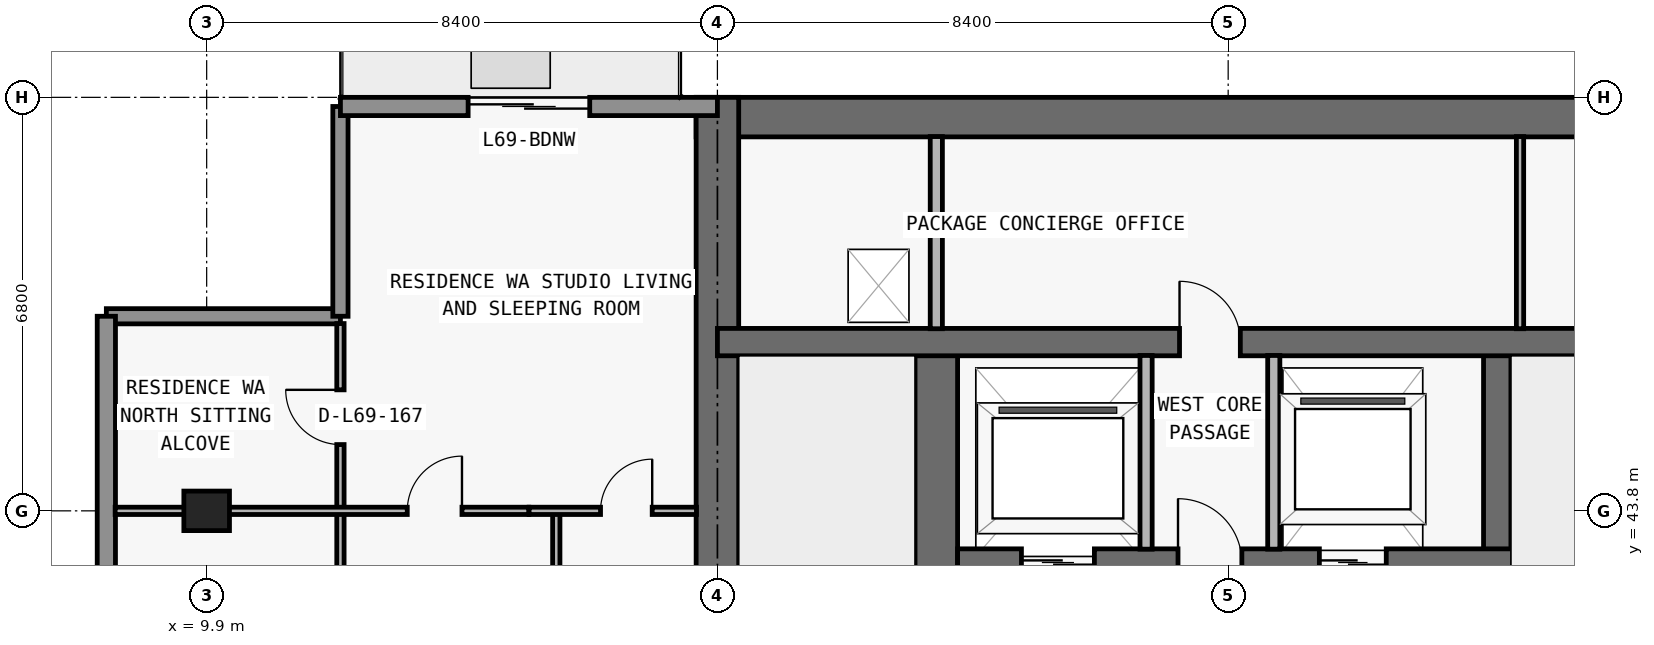
"""IFC4 building model, lengths in metres.
Left out: names, types, materials, properties, quantities, classifications, styles, units other than length and angle.
Written with IfcOpenShell. Run it as: python <this file> out.ifc"""

import sys

from ifc_helpers import new_model, si_unit, direction, frame, frame_2d, origin, origin_2d, place, context, subcontext, project, spatial, rectangle, extrude, element, fill, save


model = new_model("IFC4")
c1 = context("Model", 3, precision=1e-05, world=origin(), true_north=direction((0.0, 1.0)))
c2 = subcontext(c1, "Body", "Model", "MODEL_VIEW")
j1 = project(units=[si_unit("LENGTHUNIT", "METRE"), si_unit("PLANEANGLEUNIT", "RADIAN")], contexts=[c1])
p1 = place(None, origin())
s1 = spatial("IfcSite", under=j1, at=p1, CompositionType="ELEMENT")
p2 = place(p1, origin())
s2 = spatial("IfcBuilding", under=s1, at=p2, CompositionType="ELEMENT")
p3 = place(p2, frame((0.0, 0.0, 246.3)))
s3 = spatial("IfcBuildingStorey", under=s2, at=p3, CompositionType="ELEMENT", Elevation=246.3)
p4 = place(p3, frame((9.9, 43.8, 0.0), z_axis=(0.0, 0.0, 1.0), x_axis=(1.0, 0.0, 0.0)))
e1 = element("IfcColumn", 1, at=p4, inside=s3, PredefinedType="COLUMN", context=c2, shape_type="SweptSolid", body=[
    extrude(rectangle(XDim=0.75, YDim=0.65, at=origin_2d()), origin(), (0.0, 0.0, 1.0), 3.05),
])
p5 = place(p3, frame((17.95, 50.275, 0.0), z_axis=(0.0, 0.0, 1.0), x_axis=(1.0, 0.0, 0.0)))
e2 = element("IfcWall", 2, at=p5, inside=s3, PredefinedType="SHEAR", context=c2, shape_type="SweptSolid", body=[
    extrude(rectangle(XDim=41.9, YDim=0.65, at=frame_2d((20.95, 0.0))), origin(), (0.0, 0.0, 1.0), 3.05),
])
p6 = place(p3, frame((18.3, 36.65, 0.0), z_axis=(0.0, 0.0, 1.0), x_axis=(0.0, 1.0, 0.0)))
e3 = element("IfcWall", 3, at=p6, inside=s3, PredefinedType="SHEAR", context=c2, shape_type="SweptSolid", body=[
    extrude(rectangle(XDim=13.95, YDim=0.7, at=frame_2d((6.975, 0.0))), origin(), (0.0, 0.0, 1.0), 3.05),
])
p7 = place(p3, frame((21.9, 37.0, 0.0), z_axis=(0.0, 0.0, 1.0), x_axis=(0.0, 1.0, 0.0)))
e4 = element("IfcWall", 4, at=p7, inside=s3, PredefinedType="SHEAR", context=c2, shape_type="SweptSolid", body=[
    extrude(rectangle(XDim=9.575, YDim=0.7, at=frame_2d((4.788, 0.0))), origin(), (0.0, 0.0, 1.0), 3.05),
])
p8 = place(p7, frame((0.55, 0.0, 0.0)))
e5 = element("IfcOpeningElement", 5, at=p8, cuts=e4, PredefinedType="OPENING", context=c2, shape_type="SweptSolid", body=[
    extrude(rectangle(XDim=1.1, YDim=2.15, at=frame_2d((0.55, 1.075))), frame((0.0, 0.36, 0.0), z_axis=(0.0, -1.0, 0.0), x_axis=(1.0, 0.0, 0.0)), (0.0, 0.0, 1.0), 0.72),
])
p9 = place(p3, frame((31.125, 37.0, 0.0), z_axis=(0.0, 0.0, 1.0), x_axis=(0.0, 1.0, 0.0)))
e6 = element("IfcWall", 6, at=p9, inside=s3, PredefinedType="SHEAR", context=c2, shape_type="SweptSolid", body=[
    extrude(rectangle(XDim=9.575, YDim=0.45, at=frame_2d((4.788, 0.0))), origin(), (0.0, 0.0, 1.0), 3.05),
])
p10 = place(p3, frame((22.25, 42.95, 0.0), z_axis=(0.0, 0.0, 1.0), x_axis=(1.0, 0.0, 0.0)))
e7 = element("IfcWall", 7, at=p10, inside=s3, PredefinedType="SHEAR", context=c2, shape_type="SweptSolid", body=[
    extrude(rectangle(XDim=33.3, YDim=0.45, at=frame_2d((16.65, 0.0))), origin(), (0.0, 0.0, 1.0), 3.05),
])
p11 = place(p10, frame((1.05, 0.0, 0.0)))
e8 = element("IfcOpeningElement", 8, at=p11, cuts=e7, PredefinedType="OPENING", context=c2, shape_type="SweptSolid", body=[
    extrude(rectangle(XDim=1.2, YDim=2.2, at=frame_2d((0.6, 1.1))), frame((0.0, 0.235, 0.0), z_axis=(0.0, -1.0, 0.0), x_axis=(1.0, 0.0, 0.0)), (0.0, 0.0, 1.0), 0.47),
])
p12 = place(p10, frame((31.05, 0.0, 0.0)))
e9 = element("IfcOpeningElement", 9, at=p12, cuts=e7, PredefinedType="OPENING", context=c2, shape_type="SweptSolid", body=[
    extrude(rectangle(XDim=1.2, YDim=2.2, at=frame_2d((0.6, 1.1))), frame((0.0, 0.235, 0.0), z_axis=(0.0, -1.0, 0.0), x_axis=(1.0, 0.0, 0.0)), (0.0, 0.0, 1.0), 0.47),
])
p13 = place(p10, frame((26.45, 0.0, 0.0)))
e10 = element("IfcOpeningElement", 10, at=p13, cuts=e7, PredefinedType="OPENING", context=c2, shape_type="SweptSolid", body=[
    extrude(rectangle(XDim=1.1, YDim=2.2, at=frame_2d((0.55, 1.1))), frame((0.0, 0.235, 0.0), z_axis=(0.0, -1.0, 0.0), x_axis=(1.0, 0.0, 0.0)), (0.0, 0.0, 1.0), 0.47),
])
p14 = place(p10, frame((5.95, 0.0, 0.0)))
e11 = element("IfcOpeningElement", 11, at=p14, cuts=e7, PredefinedType="OPENING", context=c2, shape_type="SweptSolid", body=[
    extrude(rectangle(XDim=1.1, YDim=2.2, at=frame_2d((0.55, 1.1))), frame((0.0, 0.235, 0.0), z_axis=(0.0, -1.0, 0.0), x_axis=(1.0, 0.0, 0.0)), (0.0, 0.0, 1.0), 0.47),
])
p15 = place(p10, frame((3.625, 0.0, 0.0)))
e12 = element("IfcOpeningElement", 12, at=p15, cuts=e7, PredefinedType="OPENING", context=c2, shape_type="SweptSolid", body=[
    extrude(rectangle(XDim=1.05, YDim=2.15, at=frame_2d((0.525, 1.075))), frame((0.0, 0.235, 0.0), z_axis=(0.0, -1.0, 0.0), x_axis=(1.0, 0.0, 0.0)), (0.0, 0.0, 1.0), 0.47),
])
p16 = place(p10, frame((28.675, 0.0, 0.0)))
e13 = element("IfcOpeningElement", 13, at=p16, cuts=e7, PredefinedType="OPENING", context=c2, shape_type="SweptSolid", body=[
    extrude(rectangle(XDim=1.05, YDim=2.15, at=frame_2d((0.525, 1.075))), frame((0.0, 0.235, 0.0), z_axis=(0.0, -1.0, 0.0), x_axis=(1.0, 0.0, 0.0)), (0.0, 0.0, 1.0), 0.47),
])
p17 = place(p10, frame((14.7, 0.0, 0.0)))
e14 = element("IfcOpeningElement", 14, at=p17, cuts=e7, PredefinedType="OPENING", context=c2, shape_type="SweptSolid", body=[
    extrude(rectangle(XDim=1.0, YDim=2.2, at=frame_2d((0.5, 1.1))), frame((0.0, 0.235, 0.0), z_axis=(0.0, -1.0, 0.0), x_axis=(1.0, 0.0, 0.0)), (0.0, 0.0, 1.0), 0.47),
])
p18 = place(p10, frame((21.45, 0.0, 0.0)))
e15 = element("IfcOpeningElement", 15, at=p18, cuts=e7, PredefinedType="OPENING", context=c2, shape_type="SweptSolid", body=[
    extrude(rectangle(XDim=1.0, YDim=2.2, at=frame_2d((0.5, 1.1))), frame((0.0, 0.235, 0.0), z_axis=(0.0, -1.0, 0.0), x_axis=(1.0, 0.0, 0.0)), (0.0, 0.0, 1.0), 0.47),
])
p19 = place(p3, frame((18.3, 46.575, 0.0), z_axis=(0.0, 0.0, 1.0), x_axis=(1.0, 0.0, 0.0)))
e16 = element("IfcWall", 16, at=p19, inside=s3, PredefinedType="SHEAR", context=c2, shape_type="SweptSolid", body=[
    extrude(rectangle(XDim=41.2, YDim=0.45, at=frame_2d((20.6, 0.0))), origin(), (0.0, 0.0, 1.0), 3.05),
])
p20 = place(p19, frame((7.6, 0.0, 0.0)))
e17 = element("IfcOpeningElement", 17, at=p20, cuts=e16, PredefinedType="OPENING", context=c2, shape_type="SweptSolid", body=[
    extrude(rectangle(XDim=1.0, YDim=2.2, at=frame_2d((0.5, 1.1))), frame((0.0, 0.235, 0.0), z_axis=(0.0, -1.0, 0.0), x_axis=(1.0, 0.0, 0.0)), (0.0, 0.0, 1.0), 0.47),
])
p21 = place(p19, frame((32.625, 0.0, 0.0)))
e18 = element("IfcOpeningElement", 18, at=p21, cuts=e16, PredefinedType="OPENING", context=c2, shape_type="SweptSolid", body=[
    extrude(rectangle(XDim=1.05, YDim=2.15, at=frame_2d((0.525, 1.075))), frame((0.0, 0.235, 0.0), z_axis=(0.0, -1.0, 0.0), x_axis=(1.0, 0.0, 0.0)), (0.0, 0.0, 1.0), 0.47),
])
p22 = place(p3, frame((8.25, 47.0, 0.0), z_axis=(0.0, 0.0, 1.0), x_axis=(1.0, 0.0, 0.0)))
e19 = element("IfcWall", 19, at=p22, inside=s3, PredefinedType="ELEMENTEDWALL", context=c2, shape_type="SweptSolid", body=[
    extrude(rectangle(XDim=3.85, YDim=0.25, at=frame_2d((1.925, 0.0))), origin(), (0.0, 0.0, 1.0), 3.05),
])
p23 = place(p3, frame((12.1, 47.0, 0.0), z_axis=(0.0, 0.0, 1.0), x_axis=(0.0, 1.0, 0.0)))
e20 = element("IfcWall", 20, at=p23, inside=s3, PredefinedType="ELEMENTEDWALL", context=c2, shape_type="SweptSolid", body=[
    extrude(rectangle(XDim=3.45, YDim=0.25, at=frame_2d((1.725, 0.0))), origin(), (0.0, 0.0, 1.0), 3.05),
])
p24 = place(p3, frame((8.25, 30.15, 0.0), z_axis=(0.0, 0.0, 1.0), x_axis=(0.0, 1.0, 0.0)))
e21 = element("IfcWall", 21, at=p24, inside=s3, PredefinedType="STANDARD", context=c2, shape_type="SweptSolid", body=[
    extrude(rectangle(XDim=16.85, YDim=0.3, at=frame_2d((8.425, 0.0))), origin(), (0.0, 0.0, 1.0), 3.05),
])
p25 = place(p3, frame((12.1, 50.45, 0.0), z_axis=(0.0, 0.0, 1.0), x_axis=(1.0, 0.0, 0.0)))
e22 = element("IfcWall", 22, at=p25, inside=s3, PredefinedType="STANDARD", context=c2, shape_type="SweptSolid", body=[
    extrude(rectangle(XDim=6.2, YDim=0.3, at=frame_2d((3.1, 0.0))), origin(), (0.0, 0.0, 1.0), 3.05),
])
p26 = place(p25, frame((2.1, 0.0, 0.0)))
e23 = element("IfcOpeningElement", 23, at=p26, cuts=e22, PredefinedType="OPENING", context=c2, shape_type="SweptSolid", body=[
    extrude(rectangle(XDim=2.0, YDim=2.3, at=frame_2d((1.0, 1.15))), frame((0.0, 0.16, 0.0), z_axis=(0.0, -1.0, 0.0), x_axis=(1.0, 0.0, 0.0)), (0.0, 0.0, 1.0), 0.32),
])
p27 = place(p3, frame((12.1, 37.005, 0.0), z_axis=(0.0, 0.0, 1.0), x_axis=(0.0, 1.0, 0.0)))
e24 = element("IfcWall", 24, at=p27, inside=s3, PredefinedType="PARTITIONING", context=c2, shape_type="SweptSolid", body=[
    extrude(rectangle(XDim=9.875, YDim=0.12, at=frame_2d((4.938, 0.0))), origin(), (0.0, 0.0, 1.0), 2.725),
])
p28 = place(p27, frame((2.948, 0.0, 0.0)))
e25 = element("IfcOpeningElement", 25, at=p28, cuts=e24, PredefinedType="OPENING", context=c2, shape_type="SweptSolid", body=[
    extrude(rectangle(XDim=0.9, YDim=2.15, at=frame_2d((0.45, 1.075))), frame((0.0, 0.07, 0.0), z_axis=(0.0, -1.0, 0.0), x_axis=(1.0, 0.0, 0.0)), (0.0, 0.0, 1.0), 0.14),
])
p29 = place(p27, frame((7.885, 0.0, 0.0)))
e26 = element("IfcOpeningElement", 26, at=p29, cuts=e24, PredefinedType="OPENING", context=c2, shape_type="SweptSolid", body=[
    extrude(rectangle(XDim=0.9, YDim=2.15, at=frame_2d((0.45, 1.075))), frame((0.0, 0.07, 0.0), z_axis=(0.0, -1.0, 0.0), x_axis=(1.0, 0.0, 0.0)), (0.0, 0.0, 1.0), 0.14),
])
p30 = place(p3, frame((15.65, 37.0, 0.0), z_axis=(0.0, 0.0, 1.0), x_axis=(0.0, 1.0, 0.0)))
e27 = element("IfcWall", 27, at=p30, inside=s3, PredefinedType="PARTITIONING", context=c2, shape_type="SweptSolid", body=[
    extrude(rectangle(XDim=6.8, YDim=0.12, at=frame_2d((3.4, 0.0))), origin(), (0.0, 0.0, 1.0), 3.05),
])
p31 = place(p30, frame((1.207, 0.0, 0.0)))
e28 = element("IfcOpeningElement", 28, at=p31, cuts=e27, PredefinedType="OPENING", context=c2, shape_type="SweptSolid", body=[
    extrude(rectangle(XDim=0.85, YDim=2.1, at=frame_2d((0.425, 1.05))), frame((0.0, 0.07, 0.0), z_axis=(0.0, -1.0, 0.0), x_axis=(1.0, 0.0, 0.0)), (0.0, 0.0, 1.0), 0.14),
])
p32 = place(p3, frame((21.9, 46.795, 0.0), z_axis=(0.0, 0.0, 1.0), x_axis=(0.0, 1.0, 0.0)))
e29 = element("IfcWall", 29, at=p32, inside=s3, PredefinedType="PARTITIONING", context=c2, shape_type="SweptSolid", body=[
    extrude(rectangle(XDim=3.16, YDim=0.2, at=frame_2d((1.58, 0.0))), origin(), (0.0, 0.0, 1.0), 3.05),
])
for number, where, z_axis, x_axis in (
    (30, (25.35, 43.17, 0.0), (0.0, 0.0, 1.0), (0.0, 1.0, 0.0)),
    (31, (27.45, 43.17, 0.0), (0.0, 0.0, 1.0), (0.0, 1.0, 0.0)),
):
    element("IfcWall", number, at=place(p3, frame(where, z_axis=z_axis, x_axis=x_axis)), inside=s3, PredefinedType="PARTITIONING", context=c2, shape_type="SweptSolid", body=[
        extrude(rectangle(XDim=3.185, YDim=0.2, at=frame_2d((1.593, 0.0))), origin(), (0.0, 0.0, 1.0), 3.05),
    ])
p33 = place(p3, frame((31.5, 46.795, 0.0), z_axis=(0.0, 0.0, 1.0), x_axis=(0.0, 1.0, 0.0)))
e32 = element("IfcWall", 32, at=p33, inside=s3, PredefinedType="PARTITIONING", context=c2, shape_type="SweptSolid", body=[
    extrude(rectangle(XDim=3.16, YDim=0.12, at=frame_2d((1.58, 0.0))), origin(), (0.0, 0.0, 1.0), 3.05),
])
p34 = place(p3, frame((8.395, 43.8, 0.0), z_axis=(0.0, 0.0, 1.0), x_axis=(1.0, 0.0, 0.0)))
e33 = element("IfcWall", 33, at=p34, inside=s3, PredefinedType="PARTITIONING", context=c2, shape_type="SweptSolid", body=[
    extrude(rectangle(XDim=6.803, YDim=0.12, at=frame_2d((3.401, 0.0))), origin(), (0.0, 0.0, 1.0), 2.418),
])
p35 = place(p34, frame((4.804, 0.0, 0.0)))
e34 = element("IfcOpeningElement", 34, at=p35, cuts=e33, PredefinedType="OPENING", context=c2, shape_type="SweptSolid", body=[
    extrude(rectangle(XDim=0.9, YDim=2.15, at=frame_2d((0.45, 1.075))), frame((0.0, 0.07, 0.0), z_axis=(0.0, -1.0, 0.0), x_axis=(1.0, 0.0, 0.0)), (0.0, 0.0, 1.0), 0.14),
])
p36 = place(p3, frame((15.203, 43.8, 0.0), z_axis=(0.0, 0.0, 1.0), x_axis=(1.0, 0.0, 0.0)))
e35 = element("IfcWall", 35, at=p36, inside=s3, PredefinedType="PARTITIONING", context=c2, shape_type="SweptSolid", body=[
    extrude(rectangle(XDim=2.752, YDim=0.12, at=frame_2d((1.376, 0.0))), origin(), (0.0, 0.0, 1.0), 2.418),
])
p37 = place(p36, frame((1.175, 0.0, 0.0)))
e36 = element("IfcOpeningElement", 36, at=p37, cuts=e35, PredefinedType="OPENING", context=c2, shape_type="SweptSolid", body=[
    extrude(rectangle(XDim=0.85, YDim=2.1, at=frame_2d((0.425, 1.05))), frame((0.0, 0.07, 0.0), z_axis=(0.0, -1.0, 0.0), x_axis=(1.0, 0.0, 0.0)), (0.0, 0.0, 1.0), 0.14),
])
p38 = place(p26, origin())
e37 = element("IfcDoor", 37, at=p38, inside=s3, OperationType="DOUBLE_DOOR_SLIDING", PredefinedType="DOOR", context=c2, shape_type="SweptSolid", body=[
    extrude(rectangle(XDim=2.0, YDim=2.3, at=frame_2d((1.0, 1.15))), frame((0.0, 0.025, 0.0), z_axis=(0.0, -1.0, 0.0), x_axis=(1.0, 0.0, 0.0)), (0.0, 0.0, 1.0), 0.05),
])
fill(e23, e37)
p39 = place(p11, origin())
e38 = element("IfcDoor", 38, at=p39, inside=s3, OperationType="DOUBLE_DOOR_SLIDING", PredefinedType="DOOR", context=c2, shape_type="SweptSolid", body=[
    extrude(rectangle(XDim=1.2, YDim=2.2, at=frame_2d((0.6, 1.1))), frame((0.0, 0.025, 0.0), z_axis=(0.0, -1.0, 0.0), x_axis=(1.0, 0.0, 0.0)), (0.0, 0.0, 1.0), 0.05),
])
fill(e8, e38)
p40 = place(p14, origin())
e39 = element("IfcDoor", 39, at=p40, inside=s3, OperationType="DOUBLE_DOOR_SLIDING", PredefinedType="DOOR", context=c2, shape_type="SweptSolid", body=[
    extrude(rectangle(XDim=1.1, YDim=2.2, at=frame_2d((0.55, 1.1))), frame((0.0, 0.025, 0.0), z_axis=(0.0, -1.0, 0.0), x_axis=(1.0, 0.0, 0.0)), (0.0, 0.0, 1.0), 0.05),
])
fill(e11, e39)
p41 = place(p15, origin())
e40 = element("IfcDoor", 40, at=p41, inside=s3, OperationType="SINGLE_SWING_LEFT", PredefinedType="DOOR", context=c2, shape_type="SweptSolid", body=[
    extrude(rectangle(XDim=1.05, YDim=2.15, at=frame_2d((0.525, 1.075))), frame((0.0, 0.025, 0.0), z_axis=(0.0, -1.0, 0.0), x_axis=(1.0, 0.0, 0.0)), (0.0, 0.0, 1.0), 0.05),
])
fill(e12, e40)
p42 = place(p20, origin())
e41 = element("IfcDoor", 41, at=p42, inside=s3, OperationType="SINGLE_SWING_LEFT", PredefinedType="DOOR", context=c2, shape_type="SweptSolid", body=[
    extrude(rectangle(XDim=1.0, YDim=2.2, at=frame_2d((0.5, 1.1))), frame((0.0, 0.025, 0.0), z_axis=(0.0, -1.0, 0.0), x_axis=(1.0, 0.0, 0.0)), (0.0, 0.0, 1.0), 0.05),
])
fill(e17, e41)
p43 = place(p35, origin())
e42 = element("IfcDoor", 42, at=p43, inside=s3, OperationType="SINGLE_SWING_RIGHT", PredefinedType="DOOR", context=c2, shape_type="SweptSolid", body=[
    extrude(rectangle(XDim=0.9, YDim=2.15, at=frame_2d((0.45, 1.075))), frame((0.0, 0.025, 0.0), z_axis=(0.0, -1.0, 0.0), x_axis=(1.0, 0.0, 0.0)), (0.0, 0.0, 1.0), 0.05),
])
fill(e34, e42)
p44 = place(p37, origin())
e43 = element("IfcDoor", 43, at=p44, inside=s3, OperationType="SINGLE_SWING_RIGHT", PredefinedType="DOOR", context=c2, shape_type="SweptSolid", body=[
    extrude(rectangle(XDim=0.85, YDim=2.1, at=frame_2d((0.425, 1.05))), frame((0.0, 0.025, 0.0), z_axis=(0.0, -1.0, 0.0), x_axis=(1.0, 0.0, 0.0)), (0.0, 0.0, 1.0), 0.05),
])
fill(e36, e43)
p45 = place(p29, origin())
e44 = element("IfcDoor", 44, at=p45, inside=s3, OperationType="SINGLE_SWING_RIGHT", PredefinedType="DOOR", context=c2, shape_type="SweptSolid", body=[
    extrude(rectangle(XDim=0.9, YDim=2.15, at=frame_2d((0.45, 1.075))), frame((0.0, 0.025, 0.0), z_axis=(0.0, -1.0, 0.0), x_axis=(1.0, 0.0, 0.0)), (0.0, 0.0, 1.0), 0.05),
])
fill(e26, e44)
save(model, sys.argv[1])
